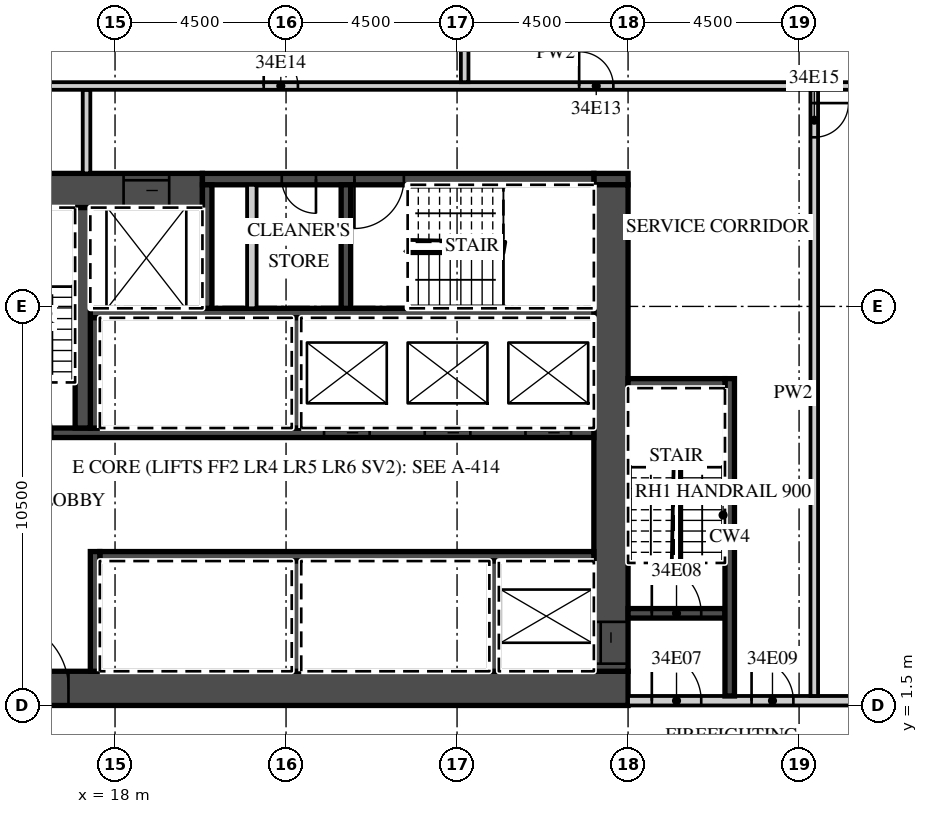
"""IFC4 building model, lengths in metres.
Left out: names, types, materials, properties, quantities, classifications, styles, units other than length and angle.
Written with IfcOpenShell. Run it as: python <this file> out.ifc"""

import sys

from ifc_helpers import new_model, si_unit, direction, frame, frame_2d, origin, place, context, subcontext, project, spatial, rectangle, extrude, element, fill, save


model = new_model("IFC4")
c1 = context("Model", 3, precision=1e-05, world=origin(), true_north=direction((0.0, 1.0)))
c2 = subcontext(c1, "Body", "Model", "MODEL_VIEW")
j1 = project(units=[si_unit("LENGTHUNIT", "METRE"), si_unit("PLANEANGLEUNIT", "RADIAN")], contexts=[c1])
p1 = place(None, origin())
s1 = spatial("IfcSite", under=j1, at=p1, CompositionType="ELEMENT")
p2 = place(p1, origin())
s2 = spatial("IfcBuilding", under=s1, at=p2, CompositionType="ELEMENT")
p3 = place(p2, frame((0.0, 0.0, 147.1)))
s3 = spatial("IfcBuildingStorey", under=s2, at=p3, CompositionType="ELEMENT", Elevation=147.1)
p4 = place(p3, frame((13.5, 1.95, 0.0), z_axis=(0.0, 0.0, 1.0), x_axis=(1.0, 0.0, 0.0)))
e1 = element("IfcWall", 1, at=p4, inside=s3, PredefinedType="SHEAR", context=c2, shape_type="SweptSolid", body=[
    extrude(rectangle(XDim=18.0, YDim=0.9, at=frame_2d((9.0, 0.0))), origin(), (0.0, 0.0, 1.0), 3.0),
])
p5 = place(p4, frame((1.475, 0.0, 0.0)))
e2 = element("IfcOpeningElement", 2, at=p5, cuts=e1, PredefinedType="OPENING", context=c2, shape_type="SweptSolid", body=[
    extrude(rectangle(XDim=1.8, YDim=2.1, at=frame_2d((0.9, 1.05))), frame((0.0, 0.46, 0.0), z_axis=(0.0, -1.0, 0.0), x_axis=(1.0, 0.0, 0.0)), (0.0, 0.0, 1.0), 0.92),
])
p6 = place(p3, frame((13.5, 15.05, 0.0), z_axis=(0.0, 0.0, 1.0), x_axis=(1.0, 0.0, 0.0)))
e3 = element("IfcWall", 3, at=p6, inside=s3, PredefinedType="SHEAR", context=c2, shape_type="SweptSolid", body=[
    extrude(rectangle(XDim=6.8, YDim=0.9, at=frame_2d((3.4, 0.0))), origin(), (0.0, 0.0, 1.0), 3.0),
])
p7 = place(p6, frame((4.725, 0.0, 0.0)))
e4 = element("IfcOpeningElement", 4, at=p7, cuts=e3, PredefinedType="OPENING", context=c2, shape_type="SweptSolid", body=[
    extrude(rectangle(XDim=1.2, YDim=2.1, at=frame_2d((0.6, 1.05))), frame((0.0, 0.46, 0.0), z_axis=(0.0, -1.0, 0.0), x_axis=(1.0, 0.0, 0.0)), (0.0, 0.0, 1.0), 0.92),
])
p8 = place(p3, frame((30.6, 15.35, 0.0), z_axis=(0.0, 0.0, 1.0), x_axis=(1.0, 0.0, 0.0)))
e5 = element("IfcWall", 5, at=p8, inside=s3, PredefinedType="SHEAR", context=c2, shape_type="SweptSolid", body=[
    extrude(rectangle(XDim=0.9, YDim=0.3, at=frame_2d((0.45, 0.0))), origin(), (0.0, 0.0, 1.0), 3.0),
])
p9 = place(p3, frame((20.3, 15.35, 0.0), z_axis=(0.0, 0.0, 1.0), x_axis=(1.0, 0.0, 0.0)))
e6 = element("IfcWall", 6, at=p9, inside=s3, PredefinedType="SHEAR", context=c2, shape_type="SweptSolid", body=[
    extrude(rectangle(XDim=10.3, YDim=0.3, at=frame_2d((5.15, 0.0))), origin(), (0.0, 0.0, 1.0), 3.0),
])
p10 = place(p9, frame((4.0, 0.0, 0.0)))
e7 = element("IfcOpeningElement", 7, at=p10, cuts=e6, PredefinedType="OPENING", context=c2, shape_type="SweptSolid", body=[
    extrude(rectangle(XDim=1.3, YDim=2.1, at=frame_2d((0.65, 1.05))), frame((0.0, 0.16, 0.0), z_axis=(0.0, -1.0, 0.0), x_axis=(1.0, 0.0, 0.0)), (0.0, 0.0, 1.0), 0.32),
])
p11 = place(p9, frame((2.087, 0.0, 0.0)))
e8 = element("IfcOpeningElement", 8, at=p11, cuts=e6, PredefinedType="OPENING", context=c2, shape_type="SweptSolid", body=[
    extrude(rectangle(XDim=0.9, YDim=2.1, at=frame_2d((0.45, 1.05))), frame((0.0, 0.16, 0.0), z_axis=(0.0, -1.0, 0.0), x_axis=(1.0, 0.0, 0.0)), (0.0, 0.0, 1.0), 0.32),
])
p12 = place(p3, frame((31.05, 2.4, 0.0), z_axis=(0.0, 0.0, 1.0), x_axis=(0.0, 1.0, 0.0)))
e9 = element("IfcWall", 9, at=p12, inside=s3, PredefinedType="SHEAR", context=c2, shape_type="SweptSolid", body=[
    extrude(rectangle(XDim=12.8, YDim=0.9, at=frame_2d((6.4, 0.0))), origin(), (0.0, 0.0, 1.0), 3.0),
])
p13 = place(p12, frame((0.2, 0.0, 0.0)))
e10 = element("IfcOpeningElement", 10, at=p13, cuts=e9, PredefinedType="OPENING", context=c2, shape_type="SweptSolid", body=[
    extrude(rectangle(XDim=1.1, YDim=2.1, at=frame_2d((0.55, 1.05))), frame((0.0, 0.46, 0.0), z_axis=(0.0, -1.0, 0.0), x_axis=(1.0, 0.0, 0.0)), (0.0, 0.0, 1.0), 0.92),
])
p14 = place(p3, frame((17.6, 5.425, 0.0), z_axis=(0.0, 0.0, 1.0), x_axis=(1.0, 0.0, 0.0)))
e11 = element("IfcWall", 11, at=p14, inside=s3, PredefinedType="SHEAR", context=c2, shape_type="SweptSolid", body=[
    extrude(rectangle(XDim=13.0, YDim=0.25, at=frame_2d((6.5, 0.0))), origin(), (0.0, 0.0, 1.0), 3.0),
])
p15 = place(p3, frame((17.475, 2.4, 0.0), z_axis=(0.0, 0.0, 1.0), x_axis=(0.0, 1.0, 0.0)))
e12 = element("IfcWall", 12, at=p15, inside=s3, PredefinedType="SHEAR", context=c2, shape_type="SweptSolid", body=[
    extrude(rectangle(XDim=3.15, YDim=0.25, at=frame_2d((1.575, 0.0))), origin(), (0.0, 0.0, 1.0), 3.0),
])
for number, where, z_axis, x_axis in (
    (13, (27.975, 2.4, 0.0), (0.0, 0.0, 1.0), (0.0, 1.0, 0.0)),
    (14, (22.775, 2.4, 0.0), (0.0, 0.0, 1.0), (0.0, 1.0, 0.0)),
):
    element("IfcWall", number, at=place(p3, frame(where, z_axis=z_axis, x_axis=x_axis)), inside=s3, PredefinedType="SHEAR", context=c2, shape_type="SweptSolid", body=[
        extrude(rectangle(XDim=2.9, YDim=0.25, at=frame_2d((1.45, 0.0))), origin(), (0.0, 0.0, 1.0), 3.0),
    ])
p16 = place(p3, frame((14.4, 8.675, 0.0), z_axis=(0.0, 0.0, 1.0), x_axis=(1.0, 0.0, 0.0)))
e15 = element("IfcWall", 15, at=p16, inside=s3, PredefinedType="SHEAR", context=c2, shape_type="SweptSolid", body=[
    extrude(rectangle(XDim=16.2, YDim=0.25, at=frame_2d((8.1, 0.0))), origin(), (0.0, 0.0, 1.0), 3.0),
])
p17 = place(p16, frame((14.4, 0.0, 0.0)))
e16 = element("IfcOpeningElement", 16, at=p17, cuts=e15, PredefinedType="OPENING", context=c2, shape_type="SweptSolid", body=[
    extrude(rectangle(XDim=1.2, YDim=2.1, at=frame_2d((0.6, 1.05))), frame((0.0, 0.135, 0.0), z_axis=(0.0, -1.0, 0.0), x_axis=(1.0, 0.0, 0.0)), (0.0, 0.0, 1.0), 0.27),
])
p18 = place(p16, frame((11.75, 0.0, 0.0)))
e17 = element("IfcOpeningElement", 17, at=p18, cuts=e15, PredefinedType="OPENING", context=c2, shape_type="SweptSolid", body=[
    extrude(rectangle(XDim=1.2, YDim=2.1, at=frame_2d((0.6, 1.05))), frame((0.0, 0.135, 0.0), z_axis=(0.0, -1.0, 0.0), x_axis=(1.0, 0.0, 0.0)), (0.0, 0.0, 1.0), 0.27),
])
p19 = place(p16, frame((9.1, 0.0, 0.0)))
e18 = element("IfcOpeningElement", 18, at=p19, cuts=e15, PredefinedType="OPENING", context=c2, shape_type="SweptSolid", body=[
    extrude(rectangle(XDim=1.2, YDim=2.1, at=frame_2d((0.6, 1.05))), frame((0.0, 0.135, 0.0), z_axis=(0.0, -1.0, 0.0), x_axis=(1.0, 0.0, 0.0)), (0.0, 0.0, 1.0), 0.27),
])
p20 = place(p16, frame((0.65, 0.0, 0.0)))
e19 = element("IfcOpeningElement", 19, at=p20, cuts=e15, PredefinedType="OPENING", context=c2, shape_type="SweptSolid", body=[
    extrude(rectangle(XDim=1.3, YDim=2.1, at=frame_2d((0.65, 1.05))), frame((0.0, 0.135, 0.0), z_axis=(0.0, -1.0, 0.0), x_axis=(1.0, 0.0, 0.0)), (0.0, 0.0, 1.0), 0.27),
])
p21 = place(p3, frame((17.35, 11.825, 0.0), z_axis=(0.0, 0.0, 1.0), x_axis=(1.0, 0.0, 0.0)))
e20 = element("IfcWall", 20, at=p21, inside=s3, PredefinedType="SHEAR", context=c2, shape_type="SweptSolid", body=[
    extrude(rectangle(XDim=13.25, YDim=0.25, at=frame_2d((6.625, 0.0))), origin(), (0.0, 0.0, 1.0), 3.0),
])
for number, where, z_axis, x_axis in (
    (21, (17.475, 8.8, 0.0), (0.0, 0.0, 1.0), (0.0, 1.0, 0.0)),
    (22, (22.775, 8.8, 0.0), (0.0, 0.0, 1.0), (0.0, 1.0, 0.0)),
):
    element("IfcWall", number, at=place(p3, frame(where, z_axis=z_axis, x_axis=x_axis)), inside=s3, PredefinedType="SHEAR", context=c2, shape_type="SweptSolid", body=[
        extrude(rectangle(XDim=2.9, YDim=0.25, at=frame_2d((1.45, 0.0))), origin(), (0.0, 0.0, 1.0), 3.0),
    ])
p22 = place(p3, frame((17.15, 8.8, 0.0), z_axis=(0.0, 0.0, 1.0), x_axis=(0.0, 1.0, 0.0)))
e23 = element("IfcWall", 23, at=p22, inside=s3, PredefinedType="SHEAR", context=c2, shape_type="SweptSolid", body=[
    extrude(rectangle(XDim=5.8, YDim=0.4, at=frame_2d((2.9, 0.0))), origin(), (0.0, 0.0, 1.0), 3.0),
])
for number, where, z_axis, x_axis in (
    (24, (20.425, 11.95, 0.0), (0.0, 0.0, 1.0), (0.0, 1.0, 0.0)),
    (25, (24.075, 11.95, 0.0), (0.0, 0.0, 1.0), (0.0, 1.0, 0.0)),
):
    element("IfcWall", number, at=place(p3, frame(where, z_axis=z_axis, x_axis=x_axis)), inside=s3, PredefinedType="SHEAR", context=c2, shape_type="SweptSolid", body=[
        extrude(rectangle(XDim=3.25, YDim=0.25, at=frame_2d((1.625, 0.0))), origin(), (0.0, 0.0, 1.0), 3.0),
    ])
p23 = place(p3, frame((21.6, 11.95, 0.0), z_axis=(0.0, 0.0, 1.0), x_axis=(0.0, 1.0, 0.0)))
e26 = element("IfcWall", 26, at=p23, inside=s3, PredefinedType="PARTITIONING", context=c2, shape_type="SweptSolid", body=[
    extrude(rectangle(XDim=3.25, YDim=0.25, at=frame_2d((1.625, 0.0))), origin(), (0.0, 0.0, 1.0), 3.0),
])
p24 = place(p3, frame((31.5, 1.625, 0.0), z_axis=(0.0, 0.0, 1.0), x_axis=(1.0, 0.0, 0.0)))
e27 = element("IfcWall", 27, at=p24, inside=s3, PredefinedType="PARTITIONING", context=c2, shape_type="SweptSolid", body=[
    extrude(rectangle(XDim=15.65, YDim=0.25, at=frame_2d((7.825, 0.0))), origin(), (0.0, 0.0, 1.0), 3.0),
])
p25 = place(p24, frame((0.625, 0.0, 0.0)))
e28 = element("IfcOpeningElement", 28, at=p25, cuts=e27, PredefinedType="OPENING", context=c2, shape_type="SweptSolid", body=[
    extrude(rectangle(XDim=1.3, YDim=2.1, at=frame_2d((0.65, 1.05))), frame((0.0, 0.135, 0.0), z_axis=(0.0, -1.0, 0.0), x_axis=(1.0, 0.0, 0.0)), (0.0, 0.0, 1.0), 0.27),
])
p26 = place(p24, frame((3.25, 0.0, 0.0)))
e29 = element("IfcOpeningElement", 29, at=p26, cuts=e27, PredefinedType="OPENING", context=c2, shape_type="SweptSolid", body=[
    extrude(rectangle(XDim=1.1, YDim=2.1, at=frame_2d((0.55, 1.05))), frame((0.0, 0.135, 0.0), z_axis=(0.0, -1.0, 0.0), x_axis=(1.0, 0.0, 0.0)), (0.0, 0.0, 1.0), 0.27),
])
p27 = place(p3, frame((31.5, 3.925, 0.0), z_axis=(0.0, 0.0, 1.0), x_axis=(1.0, 0.0, 0.0)))
e30 = element("IfcWall", 30, at=p27, inside=s3, PredefinedType="SHEAR", context=c2, shape_type="SweptSolid", body=[
    extrude(rectangle(XDim=2.55, YDim=0.25, at=frame_2d((1.275, 0.0))), origin(), (0.0, 0.0, 1.0), 3.0),
])
p28 = place(p27, frame((0.625, 0.0, 0.0)))
e31 = element("IfcOpeningElement", 31, at=p28, cuts=e30, PredefinedType="OPENING", context=c2, shape_type="SweptSolid", body=[
    extrude(rectangle(XDim=1.3, YDim=2.1, at=frame_2d((0.65, 1.05))), frame((0.0, 0.135, 0.0), z_axis=(0.0, -1.0, 0.0), x_axis=(1.0, 0.0, 0.0)), (0.0, 0.0, 1.0), 0.27),
])
p29 = place(p3, frame((34.175, 1.75, 0.0), z_axis=(0.0, 0.0, 1.0), x_axis=(0.0, 1.0, 0.0)))
e32 = element("IfcWall", 32, at=p29, inside=s3, PredefinedType="SHEAR", context=c2, shape_type="SweptSolid", body=[
    extrude(rectangle(XDim=8.35, YDim=0.25, at=frame_2d((4.175, 0.0))), origin(), (0.0, 0.0, 1.0), 3.0),
])
p30 = place(p3, frame((31.5, 9.975, 0.0), z_axis=(0.0, 0.0, 1.0), x_axis=(1.0, 0.0, 0.0)))
e33 = element("IfcWall", 33, at=p30, inside=s3, PredefinedType="SHEAR", context=c2, shape_type="SweptSolid", body=[
    extrude(rectangle(XDim=2.55, YDim=0.25, at=frame_2d((1.275, 0.0))), origin(), (0.0, 0.0, 1.0), 3.0),
])
p31 = place(p3, frame((17.25, 15.5, 0.0), z_axis=(0.0, 0.0, 1.0), x_axis=(0.0, 1.0, 0.0)))
e34 = element("IfcWall", 34, at=p31, inside=s3, PredefinedType="PARTITIONING", context=c2, shape_type="SweptSolid", body=[
    extrude(rectangle(XDim=2.2, YDim=0.2, at=frame_2d((1.1, 0.0))), origin(), (0.0, 0.0, 1.0), 3.0),
])
p32 = place(p3, frame((36.4, 1.75, 0.0), z_axis=(0.0, 0.0, 1.0), x_axis=(0.0, 1.0, 0.0)))
e35 = element("IfcWall", 35, at=p32, inside=s3, PredefinedType="PARTITIONING", context=c2, shape_type="SweptSolid", body=[
    extrude(rectangle(XDim=15.95, YDim=0.2, at=frame_2d((7.975, 0.0))), origin(), (0.0, 0.0, 1.0), 3.0),
])
p33 = place(p32, frame((14.7, 0.0, 0.0)))
e36 = element("IfcOpeningElement", 36, at=p33, cuts=e35, PredefinedType="OPENING", context=c2, shape_type="SweptSolid", body=[
    extrude(rectangle(XDim=0.9, YDim=2.1, at=frame_2d((0.45, 1.05))), frame((0.0, 0.11, 0.0), z_axis=(0.0, -1.0, 0.0), x_axis=(1.0, 0.0, 0.0)), (0.0, 0.0, 1.0), 0.22),
])
p34 = place(p3, frame((13.6, 17.8, 0.0), z_axis=(0.0, 0.0, 1.0), x_axis=(1.0, 0.0, 0.0)))
e37 = element("IfcWall", 37, at=p34, inside=s3, PredefinedType="PARTITIONING", context=c2, shape_type="SweptSolid", body=[
    extrude(rectangle(XDim=31.993, YDim=0.2, at=frame_2d((15.997, 0.0))), origin(), (0.0, 0.0, 1.0), 3.0),
])
p35 = place(p34, frame((16.613, 0.0, 0.0)))
e38 = element("IfcOpeningElement", 38, at=p35, cuts=e37, PredefinedType="OPENING", context=c2, shape_type="SweptSolid", body=[
    extrude(rectangle(XDim=0.9, YDim=2.1, at=frame_2d((0.45, 1.05))), frame((0.0, 0.11, 0.0), z_axis=(0.0, -1.0, 0.0), x_axis=(1.0, 0.0, 0.0)), (0.0, 0.0, 1.0), 0.22),
])
p36 = place(p34, frame((8.312, 0.0, 0.0)))
e39 = element("IfcOpeningElement", 39, at=p36, cuts=e37, PredefinedType="OPENING", context=c2, shape_type="SweptSolid", body=[
    extrude(rectangle(XDim=0.9, YDim=2.1, at=frame_2d((0.45, 1.05))), frame((0.0, 0.11, 0.0), z_axis=(0.0, -1.0, 0.0), x_axis=(1.0, 0.0, 0.0)), (0.0, 0.0, 1.0), 0.22),
])
p37 = place(p3, frame((27.2, 17.9, 0.0), z_axis=(0.0, 0.0, 1.0), x_axis=(0.0, 1.0, 0.0)))
e40 = element("IfcWall", 40, at=p37, inside=s3, PredefinedType="PARTITIONING", context=c2, shape_type="SweptSolid", body=[
    extrude(rectangle(XDim=6.082, YDim=0.2, at=frame_2d((3.041, 0.0))), origin(), (0.0, 0.0, 1.0), 3.0),
])
p38 = place(p17, origin())
e41 = element("IfcDoor", 41, at=p38, inside=s3, OperationType="SLIDING_TO_LEFT", PredefinedType="DOOR", context=c2, shape_type="SweptSolid", body=[
    extrude(rectangle(XDim=1.2, YDim=2.1, at=frame_2d((0.6, 1.05))), frame((0.0, 0.025, 0.0), z_axis=(0.0, -1.0, 0.0), x_axis=(1.0, 0.0, 0.0)), (0.0, 0.0, 1.0), 0.05),
])
fill(e16, e41)
p39 = place(p18, origin())
e42 = element("IfcDoor", 42, at=p39, inside=s3, OperationType="SLIDING_TO_RIGHT", PredefinedType="DOOR", context=c2, shape_type="SweptSolid", body=[
    extrude(rectangle(XDim=1.2, YDim=2.1, at=frame_2d((0.6, 1.05))), frame((0.0, 0.025, 0.0), z_axis=(0.0, -1.0, 0.0), x_axis=(1.0, 0.0, 0.0)), (0.0, 0.0, 1.0), 0.05),
])
fill(e17, e42)
p40 = place(p19, origin())
e43 = element("IfcDoor", 43, at=p40, inside=s3, OperationType="SLIDING_TO_RIGHT", PredefinedType="DOOR", context=c2, shape_type="SweptSolid", body=[
    extrude(rectangle(XDim=1.2, YDim=2.1, at=frame_2d((0.6, 1.05))), frame((0.0, 0.025, 0.0), z_axis=(0.0, -1.0, 0.0), x_axis=(1.0, 0.0, 0.0)), (0.0, 0.0, 1.0), 0.05),
])
fill(e18, e43)
p41 = place(p7, origin())
e44 = element("IfcDoor", 44, at=p41, inside=s3, OperationType="SLIDING_TO_LEFT", PredefinedType="DOOR", context=c2, shape_type="SweptSolid", body=[
    extrude(rectangle(XDim=1.2, YDim=2.1, at=frame_2d((0.6, 1.05))), frame((0.0, 0.025, 0.0), z_axis=(0.0, -1.0, 0.0), x_axis=(1.0, 0.0, 0.0)), (0.0, 0.0, 1.0), 0.05),
])
fill(e4, e44)
p42 = place(p13, origin())
e45 = element("IfcDoor", 45, at=p42, inside=s3, OperationType="SLIDING_TO_LEFT", PredefinedType="DOOR", context=c2, shape_type="SweptSolid", body=[
    extrude(rectangle(XDim=1.1, YDim=2.1, at=frame_2d((0.55, 1.05))), frame((0.0, 0.025, 0.0), z_axis=(0.0, -1.0, 0.0), x_axis=(1.0, 0.0, 0.0)), (0.0, 0.0, 1.0), 0.05),
])
fill(e10, e45)
p43 = place(p5, origin())
e46 = element("IfcDoor", 46, at=p43, inside=s3, OperationType="DOUBLE_DOOR_DOUBLE_SWING", PredefinedType="DOOR", context=c2, shape_type="SweptSolid", body=[
    extrude(rectangle(XDim=1.8, YDim=2.1, at=frame_2d((0.9, 1.05))), frame((0.0, 0.025, 0.0), z_axis=(0.0, -1.0, 0.0), x_axis=(1.0, 0.0, 0.0)), (0.0, 0.0, 1.0), 0.05),
])
fill(e2, e46)
p44 = place(p25, origin())
e47 = element("IfcDoor", 47, at=p44, inside=s3, OperationType="SINGLE_SWING_LEFT", PredefinedType="DOOR", context=c2, shape_type="SweptSolid", body=[
    extrude(rectangle(XDim=1.3, YDim=2.1, at=frame_2d((0.65, 1.05))), frame((0.0, 0.025, 0.0), z_axis=(0.0, -1.0, 0.0), x_axis=(1.0, 0.0, 0.0)), (0.0, 0.0, 1.0), 0.05),
])
fill(e28, e47)
p45 = place(p28, origin())
e48 = element("IfcDoor", 48, at=p45, inside=s3, OperationType="SINGLE_SWING_LEFT", PredefinedType="DOOR", context=c2, shape_type="SweptSolid", body=[
    extrude(rectangle(XDim=1.3, YDim=2.1, at=frame_2d((0.65, 1.05))), frame((0.0, 0.025, 0.0), z_axis=(0.0, -1.0, 0.0), x_axis=(1.0, 0.0, 0.0)), (0.0, 0.0, 1.0), 0.05),
])
fill(e31, e48)
p46 = place(p26, origin())
e49 = element("IfcDoor", 49, at=p46, inside=s3, OperationType="SINGLE_SWING_LEFT", PredefinedType="DOOR", context=c2, shape_type="SweptSolid", body=[
    extrude(rectangle(XDim=1.1, YDim=2.1, at=frame_2d((0.55, 1.05))), frame((0.0, 0.025, 0.0), z_axis=(0.0, -1.0, 0.0), x_axis=(1.0, 0.0, 0.0)), (0.0, 0.0, 1.0), 0.05),
])
fill(e29, e49)
p47 = place(p10, origin())
e50 = element("IfcDoor", 50, at=p47, inside=s3, OperationType="SINGLE_SWING_LEFT", PredefinedType="DOOR", context=c2, shape_type="SweptSolid", body=[
    extrude(rectangle(XDim=1.3, YDim=2.1, at=frame_2d((0.65, 1.05))), frame((0.0, 0.025, 0.0), z_axis=(0.0, -1.0, 0.0), x_axis=(1.0, 0.0, 0.0)), (0.0, 0.0, 1.0), 0.05),
])
fill(e7, e50)
p48 = place(p11, origin())
e51 = element("IfcDoor", 51, at=p48, inside=s3, OperationType="SINGLE_SWING_RIGHT", PredefinedType="DOOR", context=c2, shape_type="SweptSolid", body=[
    extrude(rectangle(XDim=0.9, YDim=2.1, at=frame_2d((0.45, 1.05))), frame((0.0, 0.025, 0.0), z_axis=(0.0, -1.0, 0.0), x_axis=(1.0, 0.0, 0.0)), (0.0, 0.0, 1.0), 0.05),
])
fill(e8, e51)
p49 = place(p35, origin())
e52 = element("IfcDoor", 52, at=p49, inside=s3, OperationType="SINGLE_SWING_LEFT", PredefinedType="DOOR", context=c2, shape_type="SweptSolid", body=[
    extrude(rectangle(XDim=0.9, YDim=2.1, at=frame_2d((0.45, 1.05))), frame((0.0, 0.025, 0.0), z_axis=(0.0, -1.0, 0.0), x_axis=(1.0, 0.0, 0.0)), (0.0, 0.0, 1.0), 0.05),
])
fill(e38, e52)
p50 = place(p36, origin())
e53 = element("IfcDoor", 53, at=p50, inside=s3, OperationType="SINGLE_SWING_LEFT", PredefinedType="DOOR", context=c2, shape_type="SweptSolid", body=[
    extrude(rectangle(XDim=0.9, YDim=2.1, at=frame_2d((0.45, 1.05))), frame((0.0, 0.025, 0.0), z_axis=(0.0, -1.0, 0.0), x_axis=(1.0, 0.0, 0.0)), (0.0, 0.0, 1.0), 0.05),
])
fill(e39, e53)
p51 = place(p33, origin())
e54 = element("IfcDoor", 54, at=p51, inside=s3, OperationType="SINGLE_SWING_RIGHT", PredefinedType="DOOR", context=c2, shape_type="SweptSolid", body=[
    extrude(rectangle(XDim=0.9, YDim=2.1, at=frame_2d((0.45, 1.05))), frame((0.0, 0.025, 0.0), z_axis=(0.0, -1.0, 0.0), x_axis=(1.0, 0.0, 0.0)), (0.0, 0.0, 1.0), 0.05),
])
fill(e36, e54)
save(model, sys.argv[1])
